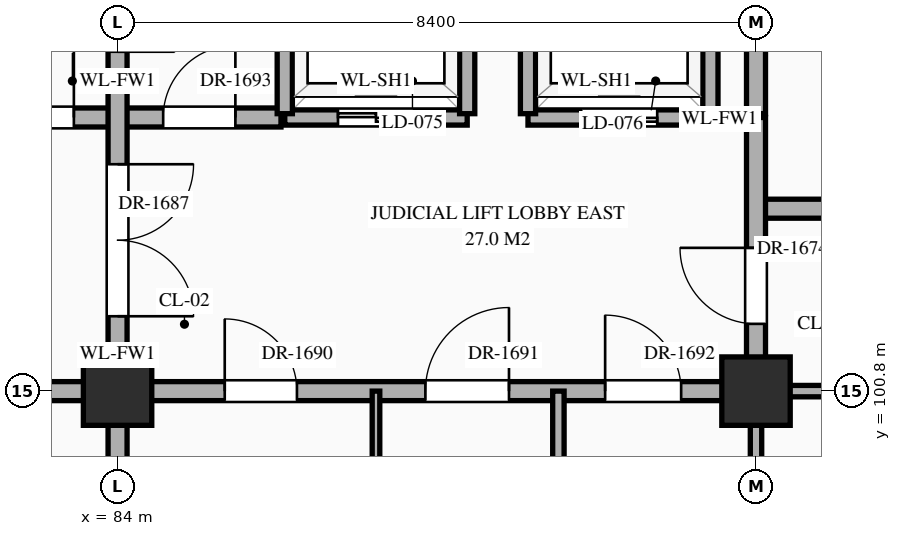
"""IFC4 building model, lengths in metres.
Left out: names, types, materials, properties, quantities, classifications, styles, units other than length and angle.
Written with IfcOpenShell. Run it as: python <this file> out.ifc"""

import sys

from ifc_helpers import new_model, si_unit, direction, frame, frame_2d, origin, origin_2d, place, context, subcontext, project, spatial, rectangle, extrude, element, fill, save


model = new_model("IFC4")
c1 = context("Model", 3, precision=1e-05, world=origin(), true_north=direction((0.0, 1.0)))
c2 = subcontext(c1, "Body", "Model", "MODEL_VIEW")
j1 = project(units=[si_unit("LENGTHUNIT", "METRE"), si_unit("PLANEANGLEUNIT", "RADIAN")], contexts=[c1])
p1 = place(None, origin())
s1 = spatial("IfcSite", under=j1, at=p1, CompositionType="ELEMENT")
p2 = place(p1, origin())
s2 = spatial("IfcBuilding", under=s1, at=p2, CompositionType="ELEMENT")
p3 = place(p2, frame((0.0, 0.0, 16.2)))
s3 = spatial("IfcBuildingStorey", under=s2, at=p3, CompositionType="ELEMENT", Elevation=16.2)
for number, where, z_axis, x_axis in (
    (1, (84.0, 100.8, 0.0), (0.0, 0.0, 1.0), (1.0, 0.0, 0.0)),
    (2, (92.4, 100.8, 0.0), (0.0, 0.0, 1.0), (1.0, 0.0, 0.0)),
):
    element("IfcColumn", number, at=place(p3, frame(where, z_axis=z_axis, x_axis=x_axis)), inside=s3, PredefinedType="COLUMN", context=c2, shape_type="SweptSolid", body=[
        extrude(rectangle(XDim=0.9, YDim=0.9, at=origin_2d()), origin(), (0.0, 0.0, 1.0), 5.4),
    ])
p4 = place(p3, frame((75.6, 100.8, 0.0), z_axis=(0.0, 0.0, 1.0), x_axis=(1.0, 0.0, 0.0)))
e3 = element("IfcWall", 3, at=p4, inside=s3, PredefinedType="STANDARD", context=c2, shape_type="SweptSolid", body=[
    extrude(rectangle(XDim=16.8, YDim=0.25, at=frame_2d((8.4, 0.0))), origin(), (0.0, 0.0, 1.0), 4.27),
])
p5 = place(p4, frame((3.65, 0.0, 0.0)))
e4 = element("IfcOpeningElement", 4, at=p5, cuts=e3, PredefinedType="OPENING", context=c2, shape_type="SweptSolid", body=[
    extrude(rectangle(XDim=1.1, YDim=2.2, at=frame_2d((0.55, 1.1))), frame((0.0, 0.137, 0.0), z_axis=(0.0, -1.0, 0.0), x_axis=(1.0, 0.0, 0.0)), (0.0, 0.0, 1.0), 0.274),
])
p6 = place(p4, frame((9.81, 0.0, 0.0)))
e5 = element("IfcOpeningElement", 5, at=p6, cuts=e3, PredefinedType="OPENING", context=c2, shape_type="SweptSolid", body=[
    extrude(rectangle(XDim=0.95, YDim=2.15, at=frame_2d((0.475, 1.075))), frame((0.0, 0.137, 0.0), z_axis=(0.0, -1.0, 0.0), x_axis=(1.0, 0.0, 0.0)), (0.0, 0.0, 1.0), 0.274),
])
p7 = place(p4, frame((12.45, 0.0, 0.0)))
e6 = element("IfcOpeningElement", 6, at=p7, cuts=e3, PredefinedType="OPENING", context=c2, shape_type="SweptSolid", body=[
    extrude(rectangle(XDim=1.1, YDim=2.2, at=frame_2d((0.55, 1.1))), frame((0.0, 0.137, 0.0), z_axis=(0.0, -1.0, 0.0), x_axis=(1.0, 0.0, 0.0)), (0.0, 0.0, 1.0), 0.274),
])
p8 = place(p4, frame((14.815, 0.0, 0.0)))
e7 = element("IfcOpeningElement", 7, at=p8, cuts=e3, PredefinedType="OPENING", context=c2, shape_type="SweptSolid", body=[
    extrude(rectangle(XDim=1.0, YDim=2.2, at=frame_2d((0.5, 1.1))), frame((0.0, 0.137, 0.0), z_axis=(0.0, -1.0, 0.0), x_axis=(1.0, 0.0, 0.0)), (0.0, 0.0, 1.0), 0.274),
])
p9 = place(p3, frame((92.4, 100.8, 0.0), z_axis=(0.0, 0.0, 1.0), x_axis=(1.0, 0.0, 0.0)))
e8 = element("IfcWall", 8, at=p9, inside=s3, PredefinedType="STANDARD", context=c2, shape_type="SweptSolid", body=[
    extrude(rectangle(XDim=4.2, YDim=0.15, at=frame_2d((2.1, 0.0))), origin(), (0.0, 0.0, 1.0), 4.27),
])
p10 = place(p9, frame((1.795, 0.0, 0.0)))
e9 = element("IfcOpeningElement", 9, at=p10, cuts=e8, PredefinedType="OPENING", context=c2, shape_type="SweptSolid", body=[
    extrude(rectangle(XDim=0.98, YDim=2.35, at=frame_2d((0.49, 1.175))), frame((0.0, 0.087, 0.0), z_axis=(0.0, -1.0, 0.0), x_axis=(1.0, 0.0, 0.0)), (0.0, 0.0, 1.0), 0.174),
])
p11 = place(p3, frame((92.4, 103.2, 0.0), z_axis=(0.0, 0.0, 1.0), x_axis=(1.0, 0.0, 0.0)))
e10 = element("IfcWall", 10, at=p11, inside=s3, PredefinedType="STANDARD", context=c2, shape_type="SweptSolid", body=[
    extrude(rectangle(XDim=4.2, YDim=0.25, at=frame_2d((2.1, 0.0))), origin(), (0.0, 0.0, 1.0), 5.12),
])
p12 = place(p11, frame((1.625, 0.0, 0.0)))
e11 = element("IfcOpeningElement", 11, at=p12, cuts=e10, PredefinedType="OPENING", context=c2, shape_type="SweptSolid", body=[
    extrude(rectangle(XDim=0.95, YDim=2.15, at=frame_2d((0.475, 1.075))), frame((0.0, 0.137, 0.0), z_axis=(0.0, -1.0, 0.0), x_axis=(1.0, 0.0, 0.0)), (0.0, 0.0, 1.0), 0.274),
])
p13 = place(p3, frame((81.85, 104.4, 0.0), z_axis=(0.0, 0.0, 1.0), x_axis=(1.0, 0.0, 0.0)))
e12 = element("IfcWall", 12, at=p13, inside=s3, PredefinedType="STANDARD", context=c2, shape_type="SweptSolid", body=[
    extrude(rectangle(XDim=4.3, YDim=0.25, at=frame_2d((2.15, 0.0))), origin(), (0.0, 0.0, 1.0), 5.12),
])
p14 = place(p13, frame((0.575, 0.0, 0.0)))
e13 = element("IfcOpeningElement", 13, at=p14, cuts=e12, PredefinedType="OPENING", context=c2, shape_type="SweptSolid", body=[
    extrude(rectangle(XDim=1.0, YDim=2.2, at=frame_2d((0.5, 1.1))), frame((0.0, 0.137, 0.0), z_axis=(0.0, -1.0, 0.0), x_axis=(1.0, 0.0, 0.0)), (0.0, 0.0, 1.0), 0.274),
])
p15 = place(p13, frame((2.75, 0.0, 0.0)))
e14 = element("IfcOpeningElement", 14, at=p15, cuts=e12, PredefinedType="OPENING", context=c2, shape_type="SweptSolid", body=[
    extrude(rectangle(XDim=0.95, YDim=2.15, at=frame_2d((0.475, 1.075))), frame((0.0, 0.137, 0.0), z_axis=(0.0, -1.0, 0.0), x_axis=(1.0, 0.0, 0.0)), (0.0, 0.0, 1.0), 0.274),
])
p16 = place(p3, frame((86.2, 104.4, 0.0), z_axis=(0.0, 0.0, 1.0), x_axis=(1.0, 0.0, 0.0)))
e15 = element("IfcWall", 15, at=p16, inside=s3, PredefinedType="STANDARD", context=c2, shape_type="SweptSolid", body=[
    extrude(rectangle(XDim=2.4, YDim=0.2, at=frame_2d((1.2, 0.0))), origin(), (0.0, 0.0, 1.0), 5.12),
])
p17 = place(p16, frame((0.7, 0.0, 0.0)))
e16 = element("IfcOpeningElement", 16, at=p17, cuts=e15, PredefinedType="OPENING", context=c2, shape_type="SweptSolid", body=[
    extrude(rectangle(XDim=1.0, YDim=2.15, at=frame_2d((0.5, 1.075))), frame((0.0, 0.112, 0.0), z_axis=(0.0, -1.0, 0.0), x_axis=(1.0, 0.0, 0.0)), (0.0, 0.0, 1.0), 0.224),
])
p18 = place(p3, frame((89.4, 104.4, 0.0), z_axis=(0.0, 0.0, 1.0), x_axis=(1.0, 0.0, 0.0)))
e17 = element("IfcWall", 17, at=p18, inside=s3, PredefinedType="STANDARD", context=c2, shape_type="SweptSolid", body=[
    extrude(rectangle(XDim=2.4, YDim=0.2, at=frame_2d((1.2, 0.0))), origin(), (0.0, 0.0, 1.0), 5.12),
])
p19 = place(p18, frame((0.7, 0.0, 0.0)))
e18 = element("IfcOpeningElement", 18, at=p19, cuts=e17, PredefinedType="OPENING", context=c2, shape_type="SweptSolid", body=[
    extrude(rectangle(XDim=1.0, YDim=2.15, at=frame_2d((0.5, 1.075))), frame((0.0, 0.112, 0.0), z_axis=(0.0, -1.0, 0.0), x_axis=(1.0, 0.0, 0.0)), (0.0, 0.0, 1.0), 0.224),
])
p20 = place(p3, frame((84.0, 79.2, 0.0), z_axis=(0.0, 0.0, 1.0), x_axis=(0.0, 1.0, 0.0)))
e19 = element("IfcWall", 19, at=p20, inside=s3, PredefinedType="STANDARD", context=c2, shape_type="SweptSolid", body=[
    extrude(rectangle(XDim=35.96, YDim=0.25, at=frame_2d((17.98, 0.0))), origin(), (0.0, 0.0, 1.0), 4.37),
])
p21 = place(p20, frame((22.585, 0.0, 0.0)))
e20 = element("IfcOpeningElement", 20, at=p21, cuts=e19, PredefinedType="OPENING", context=c2, shape_type="SweptSolid", body=[
    extrude(rectangle(XDim=2.0, YDim=2.4, at=frame_2d((1.0, 1.2))), frame((0.0, 0.137, 0.0), z_axis=(0.0, -1.0, 0.0), x_axis=(1.0, 0.0, 0.0)), (0.0, 0.0, 1.0), 0.274),
])
p22 = place(p20, frame((12.465, 0.0, 0.0)))
e21 = element("IfcOpeningElement", 21, at=p22, cuts=e19, PredefinedType="OPENING", context=c2, shape_type="SweptSolid", body=[
    extrude(rectangle(XDim=1.1, YDim=2.2, at=frame_2d((0.55, 1.1))), frame((0.0, 0.137, 0.0), z_axis=(0.0, -1.0, 0.0), x_axis=(1.0, 0.0, 0.0)), (0.0, 0.0, 1.0), 0.274),
])
p23 = place(p20, frame((15.31, 0.0, 0.0)))
e22 = element("IfcOpeningElement", 22, at=p23, cuts=e19, PredefinedType="OPENING", context=c2, shape_type="SweptSolid", body=[
    extrude(rectangle(XDim=0.95, YDim=2.15, at=frame_2d((0.475, 1.075))), frame((0.0, 0.137, 0.0), z_axis=(0.0, -1.0, 0.0), x_axis=(1.0, 0.0, 0.0)), (0.0, 0.0, 1.0), 0.274),
])
p24 = place(p20, frame((26.065, 0.0, 0.0)))
e23 = element("IfcOpeningElement", 23, at=p24, cuts=e19, PredefinedType="OPENING", context=c2, shape_type="SweptSolid", body=[
    extrude(rectangle(XDim=1.5, YDim=2.25, at=frame_2d((0.75, 1.125))), frame((0.0, 0.137, 0.0), z_axis=(0.0, -1.0, 0.0), x_axis=(1.0, 0.0, 0.0)), (0.0, 0.0, 1.0), 0.274),
])
p25 = place(p20, frame((29.71, 0.0, 0.0)))
e24 = element("IfcOpeningElement", 24, at=p25, cuts=e19, PredefinedType="OPENING", context=c2, shape_type="SweptSolid", body=[
    extrude(rectangle(XDim=0.95, YDim=2.15, at=frame_2d((0.475, 1.075))), frame((0.0, 0.137, 0.0), z_axis=(0.0, -1.0, 0.0), x_axis=(1.0, 0.0, 0.0)), (0.0, 0.0, 1.0), 0.274),
])
p26 = place(p20, frame((5.315, 0.0, 0.0)))
e25 = element("IfcOpeningElement", 25, at=p26, cuts=e19, PredefinedType="OPENING", context=c2, shape_type="SweptSolid", body=[
    extrude(rectangle(XDim=1.0, YDim=2.2, at=frame_2d((0.5, 1.1))), frame((0.0, 0.137, 0.0), z_axis=(0.0, -1.0, 0.0), x_axis=(1.0, 0.0, 0.0)), (0.0, 0.0, 1.0), 0.274),
])
p27 = place(p3, frame((86.2, 104.45, 0.0), z_axis=(0.0, 0.0, 1.0), x_axis=(0.0, 1.0, 0.0)))
e26 = element("IfcWall", 26, at=p27, inside=s3, PredefinedType="STANDARD", context=c2, shape_type="SweptSolid", body=[
    extrude(rectangle(XDim=2.3, YDim=0.2, at=frame_2d((1.15, 0.0))), origin(), (0.0, 0.0, 1.0), 5.12),
])
p28 = place(p3, frame((87.4, 96.0, 0.0), z_axis=(0.0, 0.0, 1.0), x_axis=(0.0, 1.0, 0.0)))
e27 = element("IfcWall", 27, at=p28, inside=s3, PredefinedType="STANDARD", context=c2, shape_type="SweptSolid", body=[
    extrude(rectangle(XDim=4.8, YDim=0.1, at=frame_2d((2.4, 0.0))), origin(), (0.0, 0.0, 1.0), 5.12),
])
p29 = place(p28, frame((1.91, 0.0, 0.0)))
e28 = element("IfcOpeningElement", 28, at=p29, cuts=e27, PredefinedType="OPENING", context=c2, shape_type="SweptSolid", body=[
    extrude(rectangle(XDim=0.98, YDim=2.35, at=frame_2d((0.49, 1.175))), frame((0.0, 0.062, 0.0), z_axis=(0.0, -1.0, 0.0), x_axis=(1.0, 0.0, 0.0)), (0.0, 0.0, 1.0), 0.124),
])
for number, where, z_axis, x_axis in (
    (29, (88.6, 104.45, 0.0), (0.0, 0.0, 1.0), (0.0, 1.0, 0.0)),
    (30, (89.4, 104.45, 0.0), (0.0, 0.0, 1.0), (0.0, 1.0, 0.0)),
):
    element("IfcWall", number, at=place(p3, frame(where, z_axis=z_axis, x_axis=x_axis)), inside=s3, PredefinedType="STANDARD", context=c2, shape_type="SweptSolid", body=[
        extrude(rectangle(XDim=2.3, YDim=0.2, at=frame_2d((1.15, 0.0))), origin(), (0.0, 0.0, 1.0), 5.12),
    ])
p30 = place(p3, frame((89.8, 96.0, 0.0), z_axis=(0.0, 0.0, 1.0), x_axis=(0.0, 1.0, 0.0)))
e31 = element("IfcWall", 31, at=p30, inside=s3, PredefinedType="STANDARD", context=c2, shape_type="SweptSolid", body=[
    extrude(rectangle(XDim=4.8, YDim=0.15, at=frame_2d((2.4, 0.0))), origin(), (0.0, 0.0, 1.0), 5.12),
])
p31 = place(p30, frame((1.89, 0.0, 0.0)))
e32 = element("IfcOpeningElement", 32, at=p31, cuts=e31, PredefinedType="OPENING", context=c2, shape_type="SweptSolid", body=[
    extrude(rectangle(XDim=1.02, YDim=2.4, at=frame_2d((0.51, 1.2))), frame((0.0, 0.087, 0.0), z_axis=(0.0, -1.0, 0.0), x_axis=(1.0, 0.0, 0.0)), (0.0, 0.0, 1.0), 0.174),
])
p32 = place(p3, frame((91.8, 104.45, 0.0), z_axis=(0.0, 0.0, 1.0), x_axis=(0.0, 1.0, 0.0)))
e33 = element("IfcWall", 33, at=p32, inside=s3, PredefinedType="STANDARD", context=c2, shape_type="SweptSolid", body=[
    extrude(rectangle(XDim=2.3, YDim=0.2, at=frame_2d((1.15, 0.0))), origin(), (0.0, 0.0, 1.0), 5.12),
])
p33 = place(p3, frame((92.4, 96.0, 0.0), z_axis=(0.0, 0.0, 1.0), x_axis=(0.0, 1.0, 0.0)))
e34 = element("IfcWall", 34, at=p33, inside=s3, PredefinedType="STANDARD", context=c2, shape_type="SweptSolid", body=[
    extrude(rectangle(XDim=4.8, YDim=0.15, at=frame_2d((2.4, 0.0))), origin(), (0.0, 0.0, 1.0), 4.37),
])
p34 = place(p3, frame((92.4, 100.8, 0.0), z_axis=(0.0, 0.0, 1.0), x_axis=(0.0, 1.0, 0.0)))
e35 = element("IfcWall", 35, at=p34, inside=s3, PredefinedType="STANDARD", context=c2, shape_type="SweptSolid", body=[
    extrude(rectangle(XDim=3.6, YDim=0.25, at=frame_2d((1.8, 0.0))), origin(), (0.0, 0.0, 1.0), 4.37),
])
p35 = place(p34, frame((0.885, 0.0, 0.0)))
e36 = element("IfcOpeningElement", 36, at=p35, cuts=e35, PredefinedType="OPENING", context=c2, shape_type="SweptSolid", body=[
    extrude(rectangle(XDim=1.0, YDim=2.2, at=frame_2d((0.5, 1.1))), frame((0.0, 0.137, 0.0), z_axis=(0.0, -1.0, 0.0), x_axis=(1.0, 0.0, 0.0)), (0.0, 0.0, 1.0), 0.274),
])
p36 = place(p3, frame((92.4, 104.45, 0.0), z_axis=(0.0, 0.0, 1.0), x_axis=(0.0, 1.0, 0.0)))
e37 = element("IfcWall", 37, at=p36, inside=s3, PredefinedType="STANDARD", context=c2, shape_type="SweptSolid", body=[
    extrude(rectangle(XDim=3.5, YDim=0.25, at=frame_2d((1.75, 0.0))), origin(), (0.0, 0.0, 1.0), 4.37),
])
p37 = place(p17, origin())
e38 = element("IfcDoor", 38, at=p37, inside=s3, OperationType="DOUBLE_DOOR_SLIDING", PredefinedType="DOOR", context=c2, shape_type="SweptSolid", body=[
    extrude(rectangle(XDim=1.0, YDim=2.15, at=frame_2d((0.5, 1.075))), frame((0.0, 0.025, 0.0), z_axis=(0.0, -1.0, 0.0), x_axis=(1.0, 0.0, 0.0)), (0.0, 0.0, 1.0), 0.05),
])
fill(e16, e38)
p38 = place(p19, origin())
e39 = element("IfcDoor", 39, at=p38, inside=s3, OperationType="DOUBLE_DOOR_SLIDING", PredefinedType="DOOR", context=c2, shape_type="SweptSolid", body=[
    extrude(rectangle(XDim=1.0, YDim=2.15, at=frame_2d((0.5, 1.075))), frame((0.0, 0.025, 0.0), z_axis=(0.0, -1.0, 0.0), x_axis=(1.0, 0.0, 0.0)), (0.0, 0.0, 1.0), 0.05),
])
fill(e18, e39)
p39 = place(p35, origin())
e40 = element("IfcDoor", 40, at=p39, inside=s3, OperationType="SINGLE_SWING_RIGHT", PredefinedType="DOOR", context=c2, shape_type="SweptSolid", body=[
    extrude(rectangle(XDim=1.0, YDim=2.2, at=frame_2d((0.5, 1.1))), frame((0.0, 0.025, 0.0), z_axis=(0.0, -1.0, 0.0), x_axis=(1.0, 0.0, 0.0)), (0.0, 0.0, 1.0), 0.05),
])
fill(e36, e40)
p40 = place(p21, frame((2.0, 0.0, 0.0), z_axis=(0.0, 0.0, 1.0), x_axis=(-1.0, 0.0, 0.0)))
e41 = element("IfcDoor", 41, at=p40, inside=s3, OperationType="DOUBLE_DOOR_SINGLE_SWING", PredefinedType="DOOR", context=c2, shape_type="SweptSolid", body=[
    extrude(rectangle(XDim=2.0, YDim=2.4, at=frame_2d((1.0, 1.2))), frame((0.0, 0.025, 0.0), z_axis=(0.0, -1.0, 0.0), x_axis=(1.0, 0.0, 0.0)), (0.0, 0.0, 1.0), 0.05),
])
fill(e20, e41)
p41 = place(p14, origin())
e42 = element("IfcDoor", 42, at=p41, inside=s3, OperationType="SINGLE_SWING_RIGHT", PredefinedType="DOOR", context=c2, shape_type="SweptSolid", body=[
    extrude(rectangle(XDim=1.0, YDim=2.2, at=frame_2d((0.5, 1.1))), frame((0.0, 0.025, 0.0), z_axis=(0.0, -1.0, 0.0), x_axis=(1.0, 0.0, 0.0)), (0.0, 0.0, 1.0), 0.05),
])
fill(e13, e42)
p42 = place(p6, origin())
e43 = element("IfcDoor", 43, at=p42, inside=s3, OperationType="SINGLE_SWING_LEFT", PredefinedType="DOOR", context=c2, shape_type="SweptSolid", body=[
    extrude(rectangle(XDim=0.95, YDim=2.15, at=frame_2d((0.475, 1.075))), frame((0.0, 0.025, 0.0), z_axis=(0.0, -1.0, 0.0), x_axis=(1.0, 0.0, 0.0)), (0.0, 0.0, 1.0), 0.05),
])
fill(e5, e43)
p43 = place(p7, origin())
e44 = element("IfcDoor", 44, at=p43, inside=s3, OperationType="SINGLE_SWING_RIGHT", PredefinedType="DOOR", context=c2, shape_type="SweptSolid", body=[
    extrude(rectangle(XDim=1.1, YDim=2.2, at=frame_2d((0.55, 1.1))), frame((0.0, 0.025, 0.0), z_axis=(0.0, -1.0, 0.0), x_axis=(1.0, 0.0, 0.0)), (0.0, 0.0, 1.0), 0.05),
])
fill(e6, e44)
p44 = place(p8, origin())
e45 = element("IfcDoor", 45, at=p44, inside=s3, OperationType="SINGLE_SWING_LEFT", PredefinedType="DOOR", context=c2, shape_type="SweptSolid", body=[
    extrude(rectangle(XDim=1.0, YDim=2.2, at=frame_2d((0.5, 1.1))), frame((0.0, 0.025, 0.0), z_axis=(0.0, -1.0, 0.0), x_axis=(1.0, 0.0, 0.0)), (0.0, 0.0, 1.0), 0.05),
])
fill(e7, e45)
p45 = place(p15, origin())
e46 = element("IfcDoor", 46, at=p45, inside=s3, OperationType="SINGLE_SWING_RIGHT", PredefinedType="DOOR", context=c2, shape_type="SweptSolid", body=[
    extrude(rectangle(XDim=0.95, YDim=2.15, at=frame_2d((0.475, 1.075))), frame((0.0, 0.025, 0.0), z_axis=(0.0, -1.0, 0.0), x_axis=(1.0, 0.0, 0.0)), (0.0, 0.0, 1.0), 0.05),
])
fill(e14, e46)
save(model, sys.argv[1])
